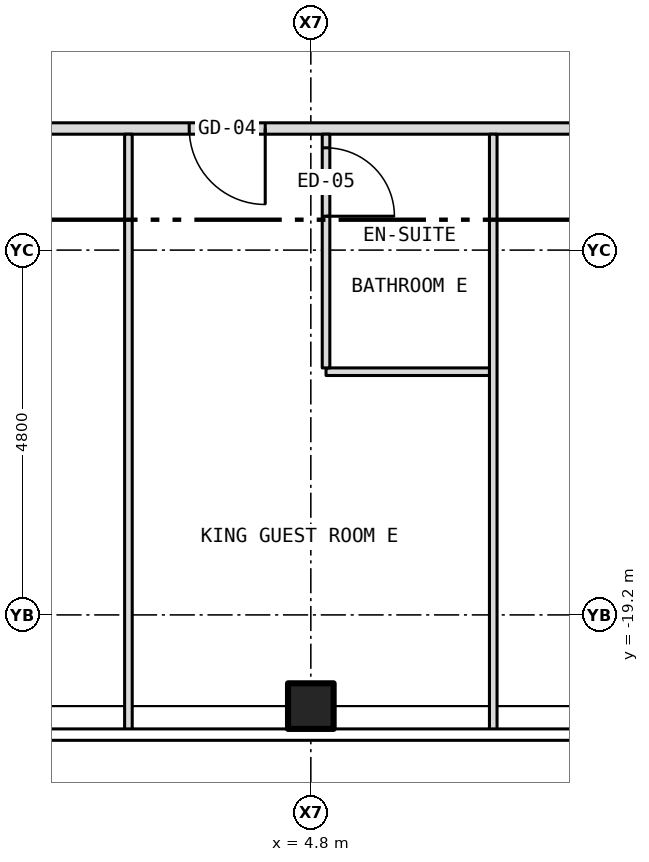
"""IFC4 building model, lengths in metres.
Left out: names, types, materials, properties, quantities, classifications, styles, units other than length and angle.
Written with IfcOpenShell. Run it as: python <this file> out.ifc"""

import sys

from ifc_helpers import new_model, si_unit, direction, frame, frame_2d, origin, origin_2d, place, context, subcontext, project, spatial, rectangle, hollow_rectangle, extrude, element, fill, save


model = new_model("IFC4")
c1 = context("Model", 3, precision=1e-05, world=origin(), true_north=direction((0.0, 1.0)))
c2 = subcontext(c1, "Body", "Model", "MODEL_VIEW")
j1 = project(units=[si_unit("LENGTHUNIT", "METRE"), si_unit("PLANEANGLEUNIT", "RADIAN")], contexts=[c1])
p1 = place(None, origin())
s1 = spatial("IfcSite", under=j1, at=p1, CompositionType="ELEMENT")
p2 = place(p1, origin())
s2 = spatial("IfcBuilding", under=s1, at=p2, CompositionType="ELEMENT")
p3 = place(p2, frame((0.0, 0.0, 251.5)))
s3 = spatial("IfcBuildingStorey", under=s2, at=p3, CompositionType="ELEMENT", Elevation=251.5)
p4 = place(p3, frame((4.8, -20.4, -0.15), z_axis=(0.0, 0.0, 1.0), x_axis=(1.0, 0.0, 0.0)))
e1 = element("IfcColumn", 1, at=p4, inside=s3, PredefinedType="COLUMN", context=c2, shape_type="SweptSolid", body=[
    extrude(hollow_rectangle(XDim=0.6, YDim=0.6, WallThickness=0.03, at=origin_2d()), origin(), (0.0, 0.0, 1.0), 3.5),
])
p5 = place(p3, frame((5.0, -16.0, 0.0), z_axis=(0.0, 0.0, 1.0), x_axis=(1.0, 0.0, 0.0)))
e2 = element("IfcWall", 2, at=p5, inside=s3, PredefinedType="PARTITIONING", context=c2, shape_type="SweptSolid", body=[
    extrude(rectangle(XDim=2.2, YDim=0.1, at=frame_2d((1.1, 0.0))), origin(), (0.0, 0.0, 1.0), 3.35),
])
p6 = place(p3, frame((-15.8, -12.8, 0.0), z_axis=(0.0, 0.0, 1.0), x_axis=(1.0, 0.0, 0.0)))
e3 = element("IfcWall", 3, at=p6, inside=s3, PredefinedType="PARTITIONING", context=c2, shape_type="SweptSolid", body=[
    extrude(rectangle(XDim=31.6, YDim=0.15, at=frame_2d((15.8, 0.0))), origin(), (0.0, 0.0, 1.0), 3.35),
])
p7 = place(p6, frame((10.55, 0.0, 0.0)))
e4 = element("IfcOpeningElement", 4, at=p7, cuts=e3, PredefinedType="OPENING", context=c2, shape_type="SweptSolid", body=[
    extrude(rectangle(XDim=0.9, YDim=2.1, at=frame_2d((0.45, 1.05))), frame((0.0, 0.087, 0.0), z_axis=(0.0, -1.0, 0.0), x_axis=(1.0, 0.0, 0.0)), (0.0, 0.0, 1.0), 0.174),
])
p8 = place(p6, frame((19.0, 0.0, 0.0)))
e5 = element("IfcOpeningElement", 5, at=p8, cuts=e3, PredefinedType="OPENING", context=c2, shape_type="SweptSolid", body=[
    extrude(rectangle(XDim=1.0, YDim=2.1, at=frame_2d((0.5, 1.05))), frame((0.0, 0.087, 0.0), z_axis=(0.0, -1.0, 0.0), x_axis=(1.0, 0.0, 0.0)), (0.0, 0.0, 1.0), 0.174),
])
p9 = place(p6, frame((24.95, 0.0, 0.0)))
e6 = element("IfcOpeningElement", 6, at=p9, cuts=e3, PredefinedType="OPENING", context=c2, shape_type="SweptSolid", body=[
    extrude(rectangle(XDim=0.9, YDim=2.1, at=frame_2d((0.45, 1.05))), frame((0.0, 0.087, 0.0), z_axis=(0.0, -1.0, 0.0), x_axis=(1.0, 0.0, 0.0)), (0.0, 0.0, 1.0), 0.174),
])
p10 = place(p6, frame((1.4, 0.0, 0.0)))
e7 = element("IfcOpeningElement", 7, at=p10, cuts=e3, PredefinedType="OPENING", context=c2, shape_type="SweptSolid", body=[
    extrude(rectangle(XDim=1.0, YDim=2.1, at=frame_2d((0.5, 1.05))), frame((0.0, 0.087, 0.0), z_axis=(0.0, -1.0, 0.0), x_axis=(1.0, 0.0, 0.0)), (0.0, 0.0, 1.0), 0.174),
])
p11 = place(p6, frame((29.2, 0.0, 0.0)))
e8 = element("IfcOpeningElement", 8, at=p11, cuts=e3, PredefinedType="OPENING", context=c2, shape_type="SweptSolid", body=[
    extrude(rectangle(XDim=1.0, YDim=2.1, at=frame_2d((0.5, 1.05))), frame((0.0, 0.087, 0.0), z_axis=(0.0, -1.0, 0.0), x_axis=(1.0, 0.0, 0.0)), (0.0, 0.0, 1.0), 0.174),
])
p12 = place(p3, frame((2.4, -20.73, 0.0), z_axis=(0.0, 0.0, 1.0), x_axis=(0.0, 1.0, 0.0)))
e9 = element("IfcWall", 9, at=p12, inside=s3, PredefinedType="PARTITIONING", context=c2, shape_type="SweptSolid", body=[
    extrude(rectangle(XDim=7.855, YDim=0.1, at=frame_2d((3.927, 0.0))), origin(), (0.0, 0.0, 1.0), 3.35),
])
p13 = place(p3, frame((5.0, -15.95, 0.0), z_axis=(0.0, 0.0, 1.0), x_axis=(0.0, 1.0, 0.0)))
e10 = element("IfcWall", 10, at=p13, inside=s3, PredefinedType="PARTITIONING", context=c2, shape_type="SweptSolid", body=[
    extrude(rectangle(XDim=3.075, YDim=0.1, at=frame_2d((1.538, 0.0))), origin(), (0.0, 0.0, 1.0), 3.35),
])
p14 = place(p13, frame((1.996, 0.0, 0.0)))
e11 = element("IfcOpeningElement", 11, at=p14, cuts=e10, PredefinedType="OPENING", context=c2, shape_type="SweptSolid", body=[
    extrude(rectangle(XDim=0.9, YDim=2.1, at=frame_2d((0.45, 1.05))), frame((0.0, 0.062, 0.0), z_axis=(0.0, -1.0, 0.0), x_axis=(1.0, 0.0, 0.0)), (0.0, 0.0, 1.0), 0.124),
])
p15 = place(p3, frame((7.2, -20.73, 0.0), z_axis=(0.0, 0.0, 1.0), x_axis=(0.0, 1.0, 0.0)))
e12 = element("IfcWall", 12, at=p15, inside=s3, PredefinedType="PARTITIONING", context=c2, shape_type="SweptSolid", body=[
    extrude(rectangle(XDim=7.855, YDim=0.1, at=frame_2d((3.927, 0.0))), origin(), (0.0, 0.0, 1.0), 3.35),
])
p16 = place(p8, origin())
e13 = element("IfcDoor", 13, at=p16, inside=s3, OperationType="SINGLE_SWING_RIGHT", PredefinedType="DOOR", context=c2, shape_type="SweptSolid", body=[
    extrude(rectangle(XDim=1.0, YDim=2.1, at=frame_2d((0.5, 1.05))), frame((0.0, 0.025, 0.0), z_axis=(0.0, -1.0, 0.0), x_axis=(1.0, 0.0, 0.0)), (0.0, 0.0, 1.0), 0.05),
])
fill(e5, e13)
p17 = place(p14, origin())
e14 = element("IfcDoor", 14, at=p17, inside=s3, OperationType="SINGLE_SWING_LEFT", PredefinedType="DOOR", context=c2, shape_type="SweptSolid", body=[
    extrude(rectangle(XDim=0.9, YDim=2.1, at=frame_2d((0.45, 1.05))), frame((0.0, 0.025, 0.0), z_axis=(0.0, -1.0, 0.0), x_axis=(1.0, 0.0, 0.0)), (0.0, 0.0, 1.0), 0.05),
])
fill(e11, e14)
save(model, sys.argv[1])
